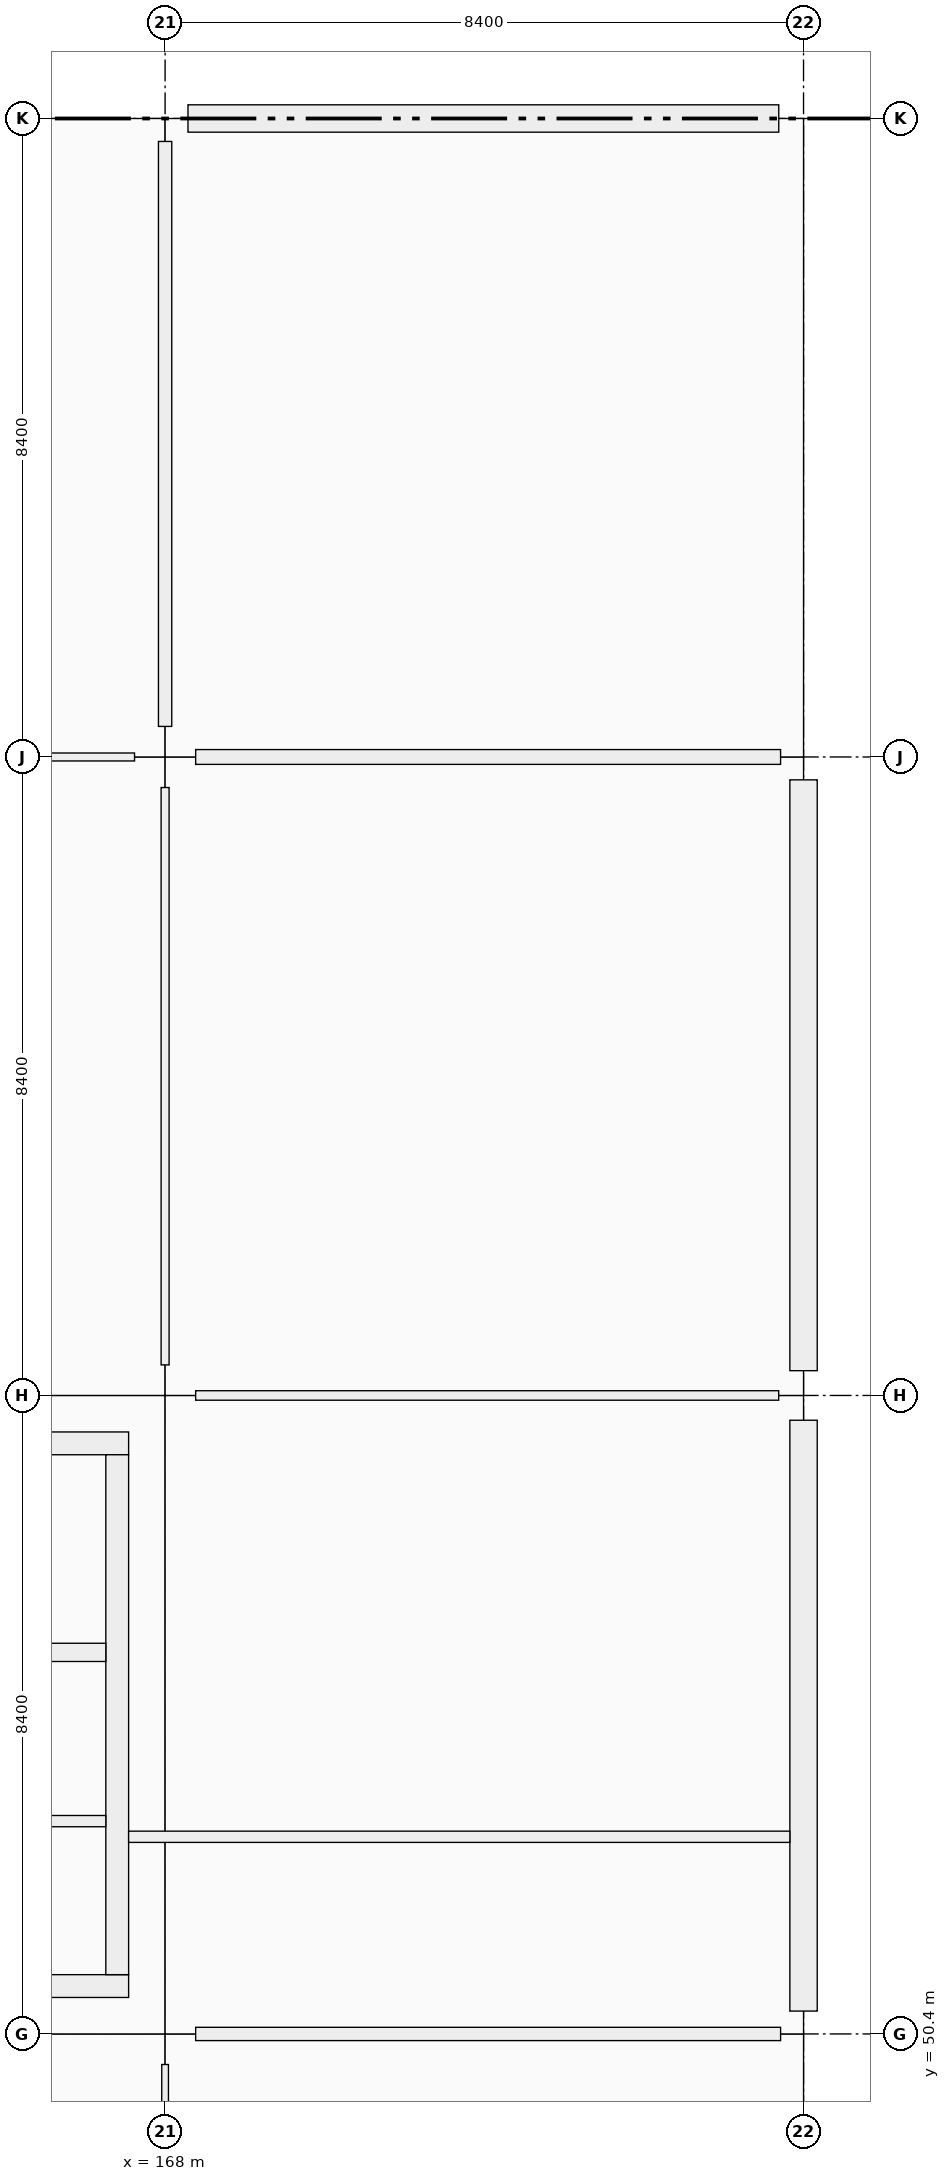
"""IFC4 building model, lengths in metres.
Left out: names, types, materials, properties, quantities, classifications, styles, units other than length and angle.
Written with IfcOpenShell. Run it as: python <this file> out.ifc"""

import sys

from ifc_helpers import new_model, si_unit, direction, frame, frame_2d, origin, origin_2d, place, context, subcontext, project, spatial, rectangle, extrude, element, fill, save


model = new_model("IFC4")
c1 = context("Model", 3, precision=1e-05, world=origin(), true_north=direction((0.0, 1.0)))
c2 = subcontext(c1, "Body", "Model", "MODEL_VIEW")
j1 = project(units=[si_unit("LENGTHUNIT", "METRE"), si_unit("PLANEANGLEUNIT", "RADIAN")], contexts=[c1])
p1 = place(None, origin())
s1 = spatial("IfcSite", under=j1, at=p1, CompositionType="ELEMENT")
p2 = place(p1, origin())
s2 = spatial("IfcBuilding", under=s1, at=p2, CompositionType="ELEMENT")
p3 = place(p2, origin())
s3 = spatial("IfcBuildingStorey", under=s2, at=p3, CompositionType="ELEMENT", Elevation=0.0)
for number, where, z_axis, x_axis in (
    (1, (168.0, 50.4, 0.0), (0.0, 0.0, 1.0), (1.0, 0.0, 0.0)),
    (2, (168.0, 58.8, 0.0), (0.0, 0.0, 1.0), (1.0, 0.0, 0.0)),
    (3, (168.0, 67.2, 0.0), (0.0, 0.0, 1.0), (1.0, 0.0, 0.0)),
):
    element("IfcColumn", number, at=place(p3, frame(where, z_axis=z_axis, x_axis=x_axis)), inside=s3, PredefinedType="COLUMN", context=c2, shape_type="SweptSolid", body=[
        extrude(rectangle(XDim=0.8, YDim=0.8, at=origin_2d()), origin(), (0.0, 0.0, 1.0), 5.76),
    ])
for number, where, z_axis, x_axis in (
    (4, (168.0, 75.6, 0.0), (0.0, 0.0, 1.0), (1.0, 0.0, 0.0)),
    (5, (176.4, 50.4, 0.0), (0.0, 0.0, 1.0), (1.0, 0.0, 0.0)),
):
    element("IfcColumn", number, at=place(p3, frame(where, z_axis=z_axis, x_axis=x_axis)), inside=s3, PredefinedType="COLUMN", context=c2, shape_type="SweptSolid", body=[
        extrude(rectangle(XDim=0.6, YDim=0.6, at=origin_2d()), origin(), (0.0, 0.0, 1.0), 5.76),
    ])
p4 = place(p3, frame((176.4, 58.8, 0.0), z_axis=(0.0, 0.0, 1.0), x_axis=(1.0, 0.0, 0.0)))
e6 = element("IfcColumn", 6, at=p4, inside=s3, PredefinedType="COLUMN", context=c2, shape_type="SweptSolid", body=[
    extrude(rectangle(XDim=0.65, YDim=0.65, at=origin_2d()), origin(), (0.0, 0.0, 1.0), 5.76),
])
p5 = place(p3, frame((176.4, 67.2, 0.0), z_axis=(0.0, 0.0, 1.0), x_axis=(1.0, 0.0, 0.0)))
e7 = element("IfcColumn", 7, at=p5, inside=s3, PredefinedType="COLUMN", context=c2, shape_type="SweptSolid", body=[
    extrude(rectangle(XDim=0.6, YDim=0.6, at=origin_2d()), origin(), (0.0, 0.0, 1.0), 5.76),
])
p6 = place(p3, frame((176.4, 75.6, 0.0), z_axis=(0.0, 0.0, 1.0), x_axis=(1.0, 0.0, 0.0)))
e8 = element("IfcColumn", 8, at=p6, inside=s3, PredefinedType="COLUMN", context=c2, shape_type="SweptSolid", body=[
    extrude(rectangle(XDim=0.65, YDim=0.65, at=origin_2d()), origin(), (0.0, 0.0, 1.0), 5.76),
])
p7 = place(p3, frame((176.4, 58.474, 0.0), z_axis=(0.0, 0.0, 1.0), x_axis=(0.0, -1.0, 0.0)))
e9 = element("IfcWall", 9, at=p7, inside=s3, PredefinedType="SOLIDWALL", context=c2, shape_type="SweptSolid", body=[
    extrude(rectangle(XDim=7.773, YDim=0.36, at=frame_2d((3.887, 0.0))), origin(), (0.0, 0.0, 1.0), 4.7),
])
p8 = place(p7, frame((2.886, 0.0, 0.0)))
e10 = element("IfcOpeningElement", 10, at=p8, cuts=e9, PredefinedType="OPENING", context=c2, shape_type="SweptSolid", body=[
    extrude(rectangle(XDim=2.0, YDim=2.25, at=frame_2d((1.0, 1.125))), frame((0.0, 0.18, 0.0), z_axis=(0.0, -1.0, 0.0), x_axis=(1.0, 0.0, 0.0)), (0.0, 0.0, 1.0), 0.36),
])
p9 = place(p7, frame((5.624, 0.0, 0.0)))
e11 = element("IfcOpeningElement", 11, at=p9, cuts=e9, PredefinedType="OPENING", context=c2, shape_type="SweptSolid", body=[
    extrude(rectangle(XDim=2.0, YDim=2.25, at=frame_2d((1.0, 1.125))), frame((0.0, 0.18, 0.0), z_axis=(0.0, -1.0, 0.0), x_axis=(1.0, 0.0, 0.0)), (0.0, 0.0, 1.0), 0.36),
])
p10 = place(p3, frame((176.4, 66.899, 0.0), z_axis=(0.0, 0.0, 1.0), x_axis=(0.0, -1.0, 0.0)))
e12 = element("IfcWall", 12, at=p10, inside=s3, PredefinedType="SOLIDWALL", context=c2, shape_type="SweptSolid", body=[
    extrude(rectangle(XDim=7.773, YDim=0.36, at=frame_2d((3.886, 0.0))), origin(), (0.0, 0.0, 1.0), 4.7),
])
p11 = place(p10, frame((3.286, 0.0, 0.9)))
e13 = element("IfcOpeningElement", 13, at=p11, cuts=e12, PredefinedType="OPENING", context=c2, shape_type="SweptSolid", body=[
    extrude(rectangle(XDim=1.2, YDim=2.1, at=frame_2d((0.6, 1.05))), frame((0.0, 0.18, 0.0), z_axis=(0.0, -1.0, 0.0), x_axis=(1.0, 0.0, 0.0)), (0.0, 0.0, 1.0), 0.36),
])
p12 = place(p3, frame((168.301, 75.6, 0.0), z_axis=(0.0, 0.0, 1.0), x_axis=(1.0, 0.0, 0.0)))
e14 = element("IfcWall", 14, at=p12, inside=s3, PredefinedType="SOLIDWALL", context=c2, shape_type="SweptSolid", body=[
    extrude(rectangle(XDim=7.773, YDim=0.36, at=frame_2d((3.886, 0.0))), origin(), (0.0, 0.0, 1.0), 4.7),
])
p13 = place(p12, frame((2.386, 0.0, 0.9)))
e15 = element("IfcOpeningElement", 15, at=p13, cuts=e14, PredefinedType="OPENING", context=c2, shape_type="SweptSolid", body=[
    extrude(rectangle(XDim=3.0, YDim=1.2, at=frame_2d((1.5, 0.6))), frame((0.0, 0.18, 0.0), z_axis=(0.0, -1.0, 0.0), x_axis=(1.0, 0.0, 0.0)), (0.0, 0.0, 1.0), 0.36),
])
p14 = place(p3, frame((167.52, 51.03, 0.0), z_axis=(0.0, 0.0, 1.0), x_axis=(-1.0, 0.0, 0.0)))
e16 = element("IfcWall", 16, at=p14, inside=s3, PredefinedType="SHEAR", context=c2, shape_type="SweptSolid", body=[
    extrude(rectangle(XDim=7.44, YDim=0.3, at=frame_2d((3.72, 0.0))), origin(), (0.0, 0.0, 1.0), 5.76),
])
p15 = place(p14, frame((1.28, 0.0, 0.0)))
e17 = element("IfcOpeningElement", 17, at=p15, cuts=e16, PredefinedType="OPENING", context=c2, shape_type="SweptSolid", body=[
    extrude(rectangle(XDim=1.5, YDim=2.15, at=frame_2d((0.75, 1.075))), frame((0.0, 0.15, 0.0), z_axis=(0.0, -1.0, 0.0), x_axis=(1.0, 0.0, 0.0)), (0.0, 0.0, 1.0), 0.3),
])
p16 = place(p3, frame((160.08, 58.17, 0.0), z_axis=(0.0, 0.0, 1.0), x_axis=(1.0, 0.0, 0.0)))
e18 = element("IfcWall", 18, at=p16, inside=s3, PredefinedType="SHEAR", context=c2, shape_type="SweptSolid", body=[
    extrude(rectangle(XDim=7.44, YDim=0.3, at=frame_2d((3.72, 0.0))), origin(), (0.0, 0.0, 1.0), 5.76),
])
p17 = place(p3, frame((167.37, 58.02, 0.0), z_axis=(0.0, 0.0, 1.0), x_axis=(0.0, -1.0, 0.0)))
e19 = element("IfcWall", 19, at=p17, inside=s3, PredefinedType="SHEAR", context=c2, shape_type="SweptSolid", body=[
    extrude(rectangle(XDim=6.84, YDim=0.3, at=frame_2d((3.42, 0.0))), origin(), (0.0, 0.0, 1.0), 5.76),
])
p18 = place(p17, frame((5.12, 0.0, 0.0)))
e20 = element("IfcOpeningElement", 20, at=p18, cuts=e19, PredefinedType="OPENING", context=c2, shape_type="SweptSolid", body=[
    extrude(rectangle(XDim=1.5, YDim=2.15, at=frame_2d((0.75, 1.075))), frame((0.0, 0.15, 0.0), z_axis=(0.0, -1.0, 0.0), x_axis=(1.0, 0.0, 0.0)), (0.0, 0.0, 1.0), 0.3),
])
p19 = place(p3, frame((163.76, 55.42, 0.0), z_axis=(0.0, 0.0, 1.0), x_axis=(1.0, 0.0, 0.0)))
e21 = element("IfcWall", 21, at=p19, inside=s3, PredefinedType="SHEAR", context=c2, shape_type="SweptSolid", body=[
    extrude(rectangle(XDim=3.46, YDim=0.24, at=frame_2d((1.73, 0.0))), origin(), (0.0, 0.0, 1.0), 5.76),
])
p20 = place(p19, frame((1.08, 0.0, 0.0)))
e22 = element("IfcOpeningElement", 22, at=p20, cuts=e21, PredefinedType="OPENING", context=c2, shape_type="SweptSolid", body=[
    extrude(rectangle(XDim=1.3, YDim=2.25, at=frame_2d((0.65, 1.125))), frame((0.0, 0.12, 0.0), z_axis=(0.0, -1.0, 0.0), x_axis=(1.0, 0.0, 0.0)), (0.0, 0.0, 1.0), 0.24),
])
p21 = place(p3, frame((167.22, 53.2, 0.0), z_axis=(0.0, 0.0, 1.0), x_axis=(-1.0, 0.0, 0.0)))
e23 = element("IfcWall", 23, at=p21, inside=s3, PredefinedType="PARTITIONING", context=c2, shape_type="SweptSolid", body=[
    extrude(rectangle(XDim=3.46, YDim=0.148, at=frame_2d((1.73, 0.0))), origin(), (0.0, 0.0, 1.0), 5.51),
])
p22 = place(p21, frame((0.98, 0.0, 0.0)))
e24 = element("IfcOpeningElement", 24, at=p22, cuts=e23, PredefinedType="OPENING", context=c2, shape_type="SweptSolid", body=[
    extrude(rectangle(XDim=1.5, YDim=2.15, at=frame_2d((0.75, 1.075))), frame((0.0, 0.074, 0.0), z_axis=(0.0, -1.0, 0.0), x_axis=(1.0, 0.0, 0.0)), (0.0, 0.0, 1.0), 0.148),
])
p23 = place(p3, frame((160.002, 67.2, 0.0), z_axis=(0.0, 0.0, 1.0), x_axis=(1.0, 0.0, 0.0)))
e25 = element("IfcWall", 25, at=p23, inside=s3, PredefinedType="PARTITIONING", context=c2, shape_type="SweptSolid", body=[
    extrude(rectangle(XDim=7.596, YDim=0.105, at=frame_2d((3.798, 0.0))), origin(), (0.0, 0.0, 1.0), 3.66),
])
p24 = place(p23, frame((3.273, 0.0, 0.0)))
e26 = element("IfcOpeningElement", 26, at=p24, cuts=e25, PredefinedType="OPENING", context=c2, shape_type="SweptSolid", body=[
    extrude(rectangle(XDim=1.05, YDim=2.12, at=frame_2d((0.525, 1.06))), frame((0.0, 0.052, 0.0), z_axis=(0.0, -1.0, 0.0), x_axis=(1.0, 0.0, 0.0)), (0.0, 0.0, 1.0), 0.105),
])
p25 = place(p3, frame((168.402, 50.4, 0.0), z_axis=(0.0, 0.0, 1.0), x_axis=(1.0, 0.0, 0.0)))
e27 = element("IfcWall", 27, at=p25, inside=s3, PredefinedType="PARTITIONING", context=c2, shape_type="SweptSolid", body=[
    extrude(rectangle(XDim=7.696, YDim=0.175, at=frame_2d((3.848, 0.0))), origin(), (0.0, 0.0, 1.0), 3.66),
])
p26 = place(p25, frame((3.308, 0.0, 0.0)))
e28 = element("IfcOpeningElement", 28, at=p26, cuts=e27, PredefinedType="OPENING", context=c2, shape_type="SweptSolid", body=[
    extrude(rectangle(XDim=1.08, YDim=2.25, at=frame_2d((0.54, 1.125))), frame((0.0, 0.087, 0.0), z_axis=(0.0, -1.0, 0.0), x_axis=(1.0, 0.0, 0.0)), (0.0, 0.0, 1.0), 0.175),
])
p27 = place(p3, frame((168.402, 58.8, 0.0), z_axis=(0.0, 0.0, 1.0), x_axis=(1.0, 0.0, 0.0)))
e29 = element("IfcWall", 29, at=p27, inside=s3, PredefinedType="PARTITIONING", context=c2, shape_type="SweptSolid", body=[
    extrude(rectangle(XDim=7.671, YDim=0.125, at=frame_2d((3.835, 0.0))), origin(), (0.0, 0.0, 1.0), 3.66),
])
p28 = place(p27, frame((3.306, 0.0, 0.0)))
e30 = element("IfcOpeningElement", 30, at=p28, cuts=e29, PredefinedType="OPENING", context=c2, shape_type="SweptSolid", body=[
    extrude(rectangle(XDim=1.06, YDim=2.25, at=frame_2d((0.53, 1.125))), frame((0.0, 0.062, 0.0), z_axis=(0.0, -1.0, 0.0), x_axis=(1.0, 0.0, 0.0)), (0.0, 0.0, 1.0), 0.125),
])
p29 = place(p3, frame((168.402, 67.2, 0.0), z_axis=(0.0, 0.0, 1.0), x_axis=(1.0, 0.0, 0.0)))
e31 = element("IfcWall", 31, at=p29, inside=s3, PredefinedType="PARTITIONING", context=c2, shape_type="SweptSolid", body=[
    extrude(rectangle(XDim=7.696, YDim=0.195, at=frame_2d((3.848, 0.0))), origin(), (0.0, 0.0, 1.0), 3.66),
])
p30 = place(p29, frame((3.328, 0.0, 0.0)))
e32 = element("IfcOpeningElement", 32, at=p30, cuts=e31, PredefinedType="OPENING", context=c2, shape_type="SweptSolid", body=[
    extrude(rectangle(XDim=1.04, YDim=2.2, at=frame_2d((0.52, 1.1))), frame((0.0, 0.098, 0.0), z_axis=(0.0, -1.0, 0.0), x_axis=(1.0, 0.0, 0.0)), (0.0, 0.0, 1.0), 0.195),
])
p31 = place(p3, frame((168.0, 42.402, 0.0), z_axis=(0.0, 0.0, 1.0), x_axis=(0.0, 1.0, 0.0)))
e33 = element("IfcWall", 33, at=p31, inside=s3, PredefinedType="PARTITIONING", context=c2, shape_type="SweptSolid", body=[
    extrude(rectangle(XDim=7.596, YDim=0.088, at=frame_2d((3.798, 0.0))), origin(), (0.0, 0.0, 1.0), 3.66),
])
p32 = place(p31, frame((3.313, 0.0, 0.0)))
e34 = element("IfcOpeningElement", 34, at=p32, cuts=e33, PredefinedType="OPENING", context=c2, shape_type="SweptSolid", body=[
    extrude(rectangle(XDim=0.97, YDim=2.12, at=frame_2d((0.485, 1.06))), frame((0.0, 0.044, 0.0), z_axis=(0.0, -1.0, 0.0), x_axis=(1.0, 0.0, 0.0)), (0.0, 0.0, 1.0), 0.088),
])
p33 = place(p3, frame((168.0, 59.202, 0.0), z_axis=(0.0, 0.0, 1.0), x_axis=(0.0, 1.0, 0.0)))
e35 = element("IfcWall", 35, at=p33, inside=s3, PredefinedType="PARTITIONING", context=c2, shape_type="SweptSolid", body=[
    extrude(rectangle(XDim=7.596, YDim=0.105, at=frame_2d((3.798, 0.0))), origin(), (0.0, 0.0, 1.0), 3.66),
])
p34 = place(p33, frame((3.258, 0.0, 0.0)))
e36 = element("IfcOpeningElement", 36, at=p34, cuts=e35, PredefinedType="OPENING", context=c2, shape_type="SweptSolid", body=[
    extrude(rectangle(XDim=1.08, YDim=2.25, at=frame_2d((0.54, 1.125))), frame((0.0, 0.052, 0.0), z_axis=(0.0, -1.0, 0.0), x_axis=(1.0, 0.0, 0.0)), (0.0, 0.0, 1.0), 0.105),
])
p35 = place(p3, frame((168.0, 67.602, 0.0), z_axis=(0.0, 0.0, 1.0), x_axis=(0.0, 1.0, 0.0)))
e37 = element("IfcWall", 37, at=p35, inside=s3, PredefinedType="PARTITIONING", context=c2, shape_type="SweptSolid", body=[
    extrude(rectangle(XDim=7.696, YDim=0.175, at=frame_2d((3.848, 0.0))), origin(), (0.0, 0.0, 1.0), 3.66),
])
p36 = place(p35, frame((3.318, 0.0, 0.0)))
e38 = element("IfcOpeningElement", 38, at=p36, cuts=e37, PredefinedType="OPENING", context=c2, shape_type="SweptSolid", body=[
    extrude(rectangle(XDim=1.06, YDim=2.25, at=frame_2d((0.53, 1.125))), frame((0.0, 0.087, 0.0), z_axis=(0.0, -1.0, 0.0), x_axis=(1.0, 0.0, 0.0)), (0.0, 0.0, 1.0), 0.175),
])
p37 = place(p3, frame((167.52, 52.994, 0.0), z_axis=(0.0, 0.0, 1.0), x_axis=(1.0, 0.0, 0.0)))
e39 = element("IfcWall", 39, at=p37, inside=s3, PredefinedType="PARTITIONING", context=c2, shape_type="SweptSolid", body=[
    extrude(rectangle(XDim=8.7, YDim=0.148, at=frame_2d((4.35, 0.0))), origin(), (0.0, 0.0, 1.0), 3.66),
])
p38 = place(p8, origin())
e40 = element("IfcDoor", 40, at=p38, inside=s3, OperationType="DOUBLE_DOOR_SINGLE_SWING", PredefinedType="DOOR", context=c2, shape_type="SweptSolid", body=[
    extrude(rectangle(XDim=2.0, YDim=2.25, at=frame_2d((1.0, 1.125))), frame((0.0, 0.025, 0.0), z_axis=(0.0, -1.0, 0.0), x_axis=(1.0, 0.0, 0.0)), (0.0, 0.0, 1.0), 0.05),
])
fill(e10, e40)
p39 = place(p9, origin())
e41 = element("IfcDoor", 41, at=p39, inside=s3, OperationType="DOUBLE_DOOR_SINGLE_SWING", PredefinedType="DOOR", context=c2, shape_type="SweptSolid", body=[
    extrude(rectangle(XDim=2.0, YDim=2.25, at=frame_2d((1.0, 1.125))), frame((0.0, 0.025, 0.0), z_axis=(0.0, -1.0, 0.0), x_axis=(1.0, 0.0, 0.0)), (0.0, 0.0, 1.0), 0.05),
])
fill(e11, e41)
p40 = place(p11, origin())
e42 = element("IfcWindow", 42, at=p40, inside=s3, PartitioningType="SINGLE_PANEL", PredefinedType="WINDOW", context=c2, shape_type="SweptSolid", body=[
    extrude(rectangle(XDim=1.2, YDim=2.1, at=frame_2d((0.6, 1.05))), frame((0.0, 0.03, 0.0), z_axis=(0.0, -1.0, 0.0), x_axis=(1.0, 0.0, 0.0)), (0.0, 0.0, 1.0), 0.06),
])
fill(e13, e42)
p41 = place(p13, origin())
e43 = element("IfcWindow", 43, at=p41, inside=s3, PartitioningType="SINGLE_PANEL", PredefinedType="WINDOW", context=c2, shape_type="SweptSolid", body=[
    extrude(rectangle(XDim=3.0, YDim=1.2, at=frame_2d((1.5, 0.6))), frame((0.0, 0.03, 0.0), z_axis=(0.0, -1.0, 0.0), x_axis=(1.0, 0.0, 0.0)), (0.0, 0.0, 1.0), 0.06),
])
fill(e15, e43)
p42 = place(p18, origin())
e44 = element("IfcDoor", 44, at=p42, inside=s3, OperationType="DOUBLE_DOOR_SINGLE_SWING", PredefinedType="DOOR", context=c2, shape_type="SweptSolid", body=[
    extrude(rectangle(XDim=1.5, YDim=2.15, at=frame_2d((0.75, 1.075))), frame((0.0, 0.025, 0.0), z_axis=(0.0, -1.0, 0.0), x_axis=(1.0, 0.0, 0.0)), (0.0, 0.0, 1.0), 0.05),
])
fill(e20, e44)
p43 = place(p26, origin())
e45 = element("IfcDoor", 45, at=p43, inside=s3, OperationType="SINGLE_SWING_RIGHT", PredefinedType="DOOR", context=c2, shape_type="SweptSolid", body=[
    extrude(rectangle(XDim=1.08, YDim=2.25, at=frame_2d((0.54, 1.125))), frame((0.0, 0.025, 0.0), z_axis=(0.0, -1.0, 0.0), x_axis=(1.0, 0.0, 0.0)), (0.0, 0.0, 1.0), 0.05),
])
fill(e28, e45)
p44 = place(p28, origin())
e46 = element("IfcDoor", 46, at=p44, inside=s3, OperationType="SINGLE_SWING_LEFT", PredefinedType="DOOR", context=c2, shape_type="SweptSolid", body=[
    extrude(rectangle(XDim=1.06, YDim=2.25, at=frame_2d((0.53, 1.125))), frame((0.0, 0.025, 0.0), z_axis=(0.0, -1.0, 0.0), x_axis=(1.0, 0.0, 0.0)), (0.0, 0.0, 1.0), 0.05),
])
fill(e30, e46)
p45 = place(p30, origin())
e47 = element("IfcDoor", 47, at=p45, inside=s3, OperationType="SINGLE_SWING_RIGHT", PredefinedType="DOOR", context=c2, shape_type="SweptSolid", body=[
    extrude(rectangle(XDim=1.04, YDim=2.2, at=frame_2d((0.52, 1.1))), frame((0.0, 0.025, 0.0), z_axis=(0.0, -1.0, 0.0), x_axis=(1.0, 0.0, 0.0)), (0.0, 0.0, 1.0), 0.05),
])
fill(e32, e47)
p46 = place(p34, origin())
e48 = element("IfcDoor", 48, at=p46, inside=s3, OperationType="SINGLE_SWING_LEFT", PredefinedType="DOOR", context=c2, shape_type="SweptSolid", body=[
    extrude(rectangle(XDim=1.08, YDim=2.25, at=frame_2d((0.54, 1.125))), frame((0.0, 0.025, 0.0), z_axis=(0.0, -1.0, 0.0), x_axis=(1.0, 0.0, 0.0)), (0.0, 0.0, 1.0), 0.05),
])
fill(e36, e48)
p47 = place(p36, origin())
e49 = element("IfcDoor", 49, at=p47, inside=s3, OperationType="SINGLE_SWING_RIGHT", PredefinedType="DOOR", context=c2, shape_type="SweptSolid", body=[
    extrude(rectangle(XDim=1.06, YDim=2.25, at=frame_2d((0.53, 1.125))), frame((0.0, 0.025, 0.0), z_axis=(0.0, -1.0, 0.0), x_axis=(1.0, 0.0, 0.0)), (0.0, 0.0, 1.0), 0.05),
])
fill(e38, e49)
save(model, sys.argv[1])
